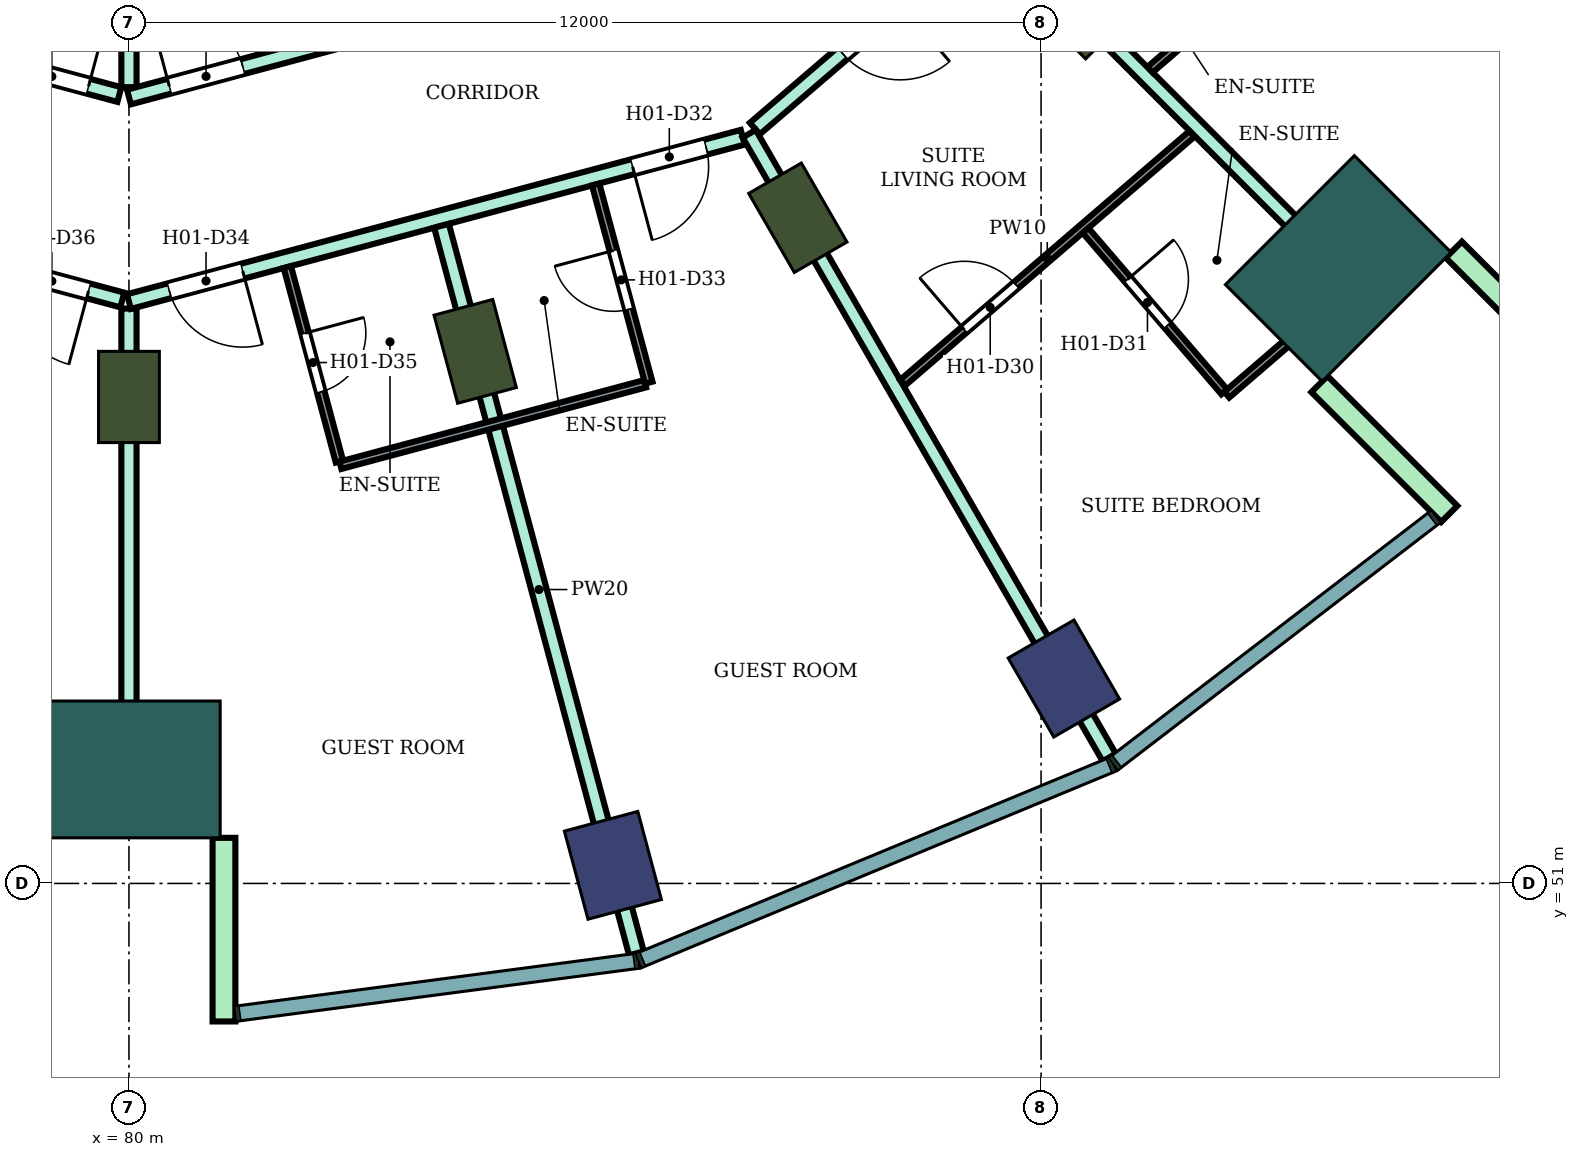
"""IFC4 building model, lengths in metres.
Left out: names, types, materials, properties, quantities, classifications, styles, units other than length and angle.
Written with IfcOpenShell. Run it as: python <this file> out.ifc"""

import sys

from ifc_helpers import new_model, si_unit, direction, frame, frame_2d, origin, origin_2d, place, context, subcontext, project, spatial, rectangle, extrude, element, fill, save


model = new_model("IFC4")
c1 = context("Model", 3, precision=1e-05, world=origin(), true_north=direction((0.0, 1.0)))
c2 = subcontext(c1, "Body", "Model", "MODEL_VIEW")
j1 = project(units=[si_unit("LENGTHUNIT", "METRE"), si_unit("PLANEANGLEUNIT", "RADIAN")], contexts=[c1])
p1 = place(None, origin())
s1 = spatial("IfcSite", under=j1, at=p1, CompositionType="ELEMENT")
p2 = place(p1, origin())
s2 = spatial("IfcBuilding", under=s1, at=p2, CompositionType="ELEMENT")
p3 = place(p2, frame((0.0, 0.0, 36.4)))
s3 = spatial("IfcBuildingStorey", under=s2, at=p3, CompositionType="ELEMENT", Elevation=36.4)
for number, where, z_axis, x_axis in (
    (1, (86.367, 51.238, 0.0), (0.0, 0.0, 1.0), (0.259, -0.966, 0.0)),
    (2, (92.3, 53.696, 0.0), (0.0, 0.0, 1.0), (0.5, -0.866, 0.0)),
):
    element("IfcColumn", number, at=place(p3, frame(where, z_axis=z_axis, x_axis=x_axis)), inside=s3, PredefinedType="COLUMN", context=c2, shape_type="SweptSolid", body=[
        extrude(rectangle(XDim=1.2, YDim=1.0, at=origin_2d()), origin(), (0.0, 0.0, 1.0), 3.8),
    ])
for number, where, z_axis, x_axis in (
    (3, (80.0, 57.4, 0.0), (0.0, 0.0, 1.0), (0.0, -1.0, 0.0)),
    (4, (84.555, 58.0, 0.0), (0.0, 0.0, 1.0), (0.259, -0.966, 0.0)),
    (5, (88.8, 59.758, 0.0), (0.0, 0.0, 1.0), (0.5, -0.866, 0.0)),
    (6, (92.445, 62.555, 0.0), (0.0, 0.0, 1.0), (0.707, -0.707, 0.0)),
):
    element("IfcColumn", number, at=place(p3, frame(where, z_axis=z_axis, x_axis=x_axis)), inside=s3, PredefinedType="COLUMN", context=c2, shape_type="SweptSolid", body=[
        extrude(rectangle(XDim=1.2, YDim=0.8, at=origin_2d()), origin(), (0.0, 0.0, 1.0), 3.8),
    ])
for number, where, z_axis, x_axis in (
    (7, (80.0, 52.5, 0.0), (0.0, 0.0, 1.0), (0.0, -1.0, 0.0)),
    (8, (95.91, 59.09, 0.0), (0.0, 0.0, 1.0), (0.707, -0.707, 0.0)),
):
    element("IfcColumn", number, at=place(p3, frame(where, z_axis=z_axis, x_axis=x_axis)), inside=s3, PredefinedType="COLUMN", context=c2, shape_type="SweptSolid", body=[
        extrude(rectangle(XDim=1.8, YDim=2.4, at=origin_2d()), origin(), (0.0, 0.0, 1.0), 3.8),
    ])
for number, where, z_axis, x_axis in (
    (9, (81.25, 51.6, 0.0), (0.0, 0.0, 1.0), (0.0, -1.0, 0.0)),
    (10, (95.662, 57.57, 0.0), (0.0, 0.0, 1.0), (0.707, -0.707, 0.0)),
    (11, (97.43, 59.338, 0.0), (0.0, 0.0, 1.0), (0.707, -0.707, 0.0)),
):
    element("IfcWall", number, at=place(p3, frame(where, z_axis=z_axis, x_axis=x_axis)), inside=s3, PredefinedType="NOTDEFINED", context=c2, shape_type="SweptSolid", body=[
        extrude(rectangle(XDim=2.416, YDim=0.3, at=frame_2d((1.208, 0.0))), origin(), (0.0, 0.0, 1.0), 3.8),
    ])
p4 = place(p3, frame((71.877, 60.831, 0.0), z_axis=(0.0, 0.0, 1.0), x_axis=(0.965852509869, -0.259092510851, 0.0)))
e12 = element("IfcWall", 12, at=p4, inside=s3, PredefinedType="PARTITIONING", context=c2, shape_type="SweptSolid", body=[
    extrude(rectangle(XDim=8.32, YDim=0.2, at=frame_2d((4.16, 0.0))), origin(), (0.0, 0.0, 1.0), 3.35),
])
p5 = place(p4, frame((6.86, 0.0, 0.0)))
e13 = element("IfcOpeningElement", 13, at=p5, cuts=e12, PredefinedType="OPENING", context=c2, shape_type="SweptSolid", body=[
    extrude(rectangle(XDim=1.0, YDim=2.1, at=frame_2d((0.5, 1.05))), frame((0.0, 0.11, 0.0), z_axis=(0.0, -1.0, 0.0), x_axis=(1.0, 0.0, 0.0)), (0.0, 0.0, 1.0), 0.22),
])
p6 = place(p3, frame((73.297, 63.143, 0.0), z_axis=(0.0, 0.0, 1.0), x_axis=(0.965859030528, -0.25906820173, 0.0)))
e14 = element("IfcWall", 14, at=p6, inside=s3, PredefinedType="PARTITIONING", context=c2, shape_type="SweptSolid", body=[
    extrude(rectangle(XDim=6.81, YDim=0.2, at=frame_2d((3.405, 0.0))), origin(), (0.0, 0.0, 1.0), 3.35),
])
p7 = place(p6, frame((5.39, 0.0, 0.0)))
e15 = element("IfcOpeningElement", 15, at=p7, cuts=e14, PredefinedType="OPENING", context=c2, shape_type="SweptSolid", body=[
    extrude(rectangle(XDim=1.0, YDim=2.1, at=frame_2d((0.5, 1.05))), frame((0.0, 0.11, 0.0), z_axis=(0.0, -1.0, 0.0), x_axis=(1.0, 0.0, 0.0)), (0.0, 0.0, 1.0), 0.22),
])
p8 = place(p3, frame((80.0, 51.801, 0.0), z_axis=(0.0, 0.0, 1.0), x_axis=(0.0, 1.0, 0.0)))
e16 = element("IfcWall", 16, at=p8, inside=s3, PredefinedType="PARTITIONING", context=c2, shape_type="SweptSolid", body=[
    extrude(rectangle(XDim=6.762, YDim=0.2, at=frame_2d((3.381, 0.0))), origin(), (0.0, 0.0, 1.0), 3.35),
])
p9 = place(p3, frame((80.0, 58.655, 0.0), z_axis=(0.0, 0.0, 1.0), x_axis=(0.965974635626, 0.258636817424, 0.0)))
e17 = element("IfcWall", 17, at=p9, inside=s3, PredefinedType="PARTITIONING", context=c2, shape_type="SweptSolid", body=[
    extrude(rectangle(XDim=8.36, YDim=0.2, at=frame_2d((4.18, 0.0))), origin(), (0.0, 0.0, 1.0), 3.35),
])
p10 = place(p9, frame((6.86, 0.0, 0.0)))
e18 = element("IfcOpeningElement", 18, at=p10, cuts=e17, PredefinedType="OPENING", context=c2, shape_type="SweptSolid", body=[
    extrude(rectangle(XDim=1.0, YDim=2.1, at=frame_2d((0.5, 1.05))), frame((0.0, 0.11, 0.0), z_axis=(0.0, -1.0, 0.0), x_axis=(1.0, 0.0, 0.0)), (0.0, 0.0, 1.0), 0.22),
])
p11 = place(p9, frame((0.55, 0.0, 0.0)))
e19 = element("IfcOpeningElement", 19, at=p11, cuts=e17, PredefinedType="OPENING", context=c2, shape_type="SweptSolid", body=[
    extrude(rectangle(XDim=1.0, YDim=2.1, at=frame_2d((0.5, 1.05))), frame((0.0, 0.11, 0.0), z_axis=(0.0, -1.0, 0.0), x_axis=(1.0, 0.0, 0.0)), (0.0, 0.0, 1.0), 0.22),
])
p12 = place(p3, frame((80.0, 61.476, 0.0), z_axis=(0.0, 0.0, 1.0), x_axis=(0.0, 1.0, 0.0)))
e20 = element("IfcWall", 20, at=p12, inside=s3, PredefinedType="PARTITIONING", context=c2, shape_type="SweptSolid", body=[
    extrude(rectangle(XDim=5.825, YDim=0.2, at=frame_2d((2.913, 0.0))), origin(), (0.0, 0.0, 1.0), 3.35),
])
p13 = place(p3, frame((80.0, 61.346, 0.0), z_axis=(0.0, 0.0, 1.0), x_axis=(0.965924181808, 0.258825182312, 0.0)))
e21 = element("IfcWall", 21, at=p13, inside=s3, PredefinedType="PARTITIONING", context=c2, shape_type="SweptSolid", body=[
    extrude(rectangle(XDim=6.94, YDim=0.2, at=frame_2d((3.47, 0.0))), origin(), (0.0, 0.0, 1.0), 3.35),
])
p14 = place(p13, frame((0.55, 0.0, 0.0)))
e22 = element("IfcOpeningElement", 22, at=p14, cuts=e21, PredefinedType="OPENING", context=c2, shape_type="SweptSolid", body=[
    extrude(rectangle(XDim=1.0, YDim=2.1, at=frame_2d((0.5, 1.05))), frame((0.0, 0.11, 0.0), z_axis=(0.0, -1.0, 0.0), x_axis=(1.0, 0.0, 0.0)), (0.0, 0.0, 1.0), 0.22),
])
p15 = place(p3, frame((84.112, 59.652, 0.0), z_axis=(0.0, 0.0, 1.0), x_axis=(0.258791091927, -0.965933315886, 0.0)))
e23 = element("IfcWall", 23, at=p15, inside=s3, PredefinedType="PARTITIONING", context=c2, shape_type="SweptSolid", body=[
    extrude(rectangle(XDim=9.909, YDim=0.2, at=frame_2d((4.955, 0.0))), origin(), (0.0, 0.0, 1.0), 3.35),
])
p16 = place(p3, frame((88.235, 60.931, 0.0), z_axis=(0.0, 0.0, 1.0), x_axis=(0.758799498714, 0.651324282329, 0.0)))
e24 = element("IfcWall", 24, at=p16, inside=s3, PredefinedType="PARTITIONING", context=c2, shape_type="SweptSolid", body=[
    extrude(rectangle(XDim=6.186, YDim=0.2, at=frame_2d((3.093, 0.0))), origin(), (0.0, 0.0, 1.0), 3.35),
])
p17 = place(p16, frame((1.519, 0.0, 0.0)))
e25 = element("IfcOpeningElement", 25, at=p17, cuts=e24, PredefinedType="OPENING", context=c2, shape_type="SweptSolid", body=[
    extrude(rectangle(XDim=1.0, YDim=2.1, at=frame_2d((0.5, 1.05))), frame((0.0, 0.11, 0.0), z_axis=(0.0, -1.0, 0.0), x_axis=(1.0, 0.0, 0.0)), (0.0, 0.0, 1.0), 0.22),
])
p18 = place(p3, frame((88.16, 60.863, 0.0), z_axis=(0.0, 0.0, 1.0), x_axis=(0.499946996988, -0.866056002925, 0.0)))
e26 = element("IfcWall", 26, at=p18, inside=s3, PredefinedType="PARTITIONING", context=c2, shape_type="SweptSolid", body=[
    extrude(rectangle(XDim=9.475, YDim=0.2, at=frame_2d((4.737, 0.0))), origin(), (0.0, 0.0, 1.0), 3.35),
])
p19 = place(p3, frame((91.449, 63.548, 0.0), z_axis=(0.0, 0.0, 1.0), x_axis=(0.706984804638, -0.707228736698, 0.0)))
e27 = element("IfcWall", 27, at=p19, inside=s3, PredefinedType="PARTITIONING", context=c2, shape_type="SweptSolid", body=[
    extrude(rectangle(XDim=7.006, YDim=0.2, at=frame_2d((3.503, 0.0))), origin(), (0.0, 0.0, 1.0), 3.35),
])
p20 = place(p3, frame((82.084, 59.108, 0.0), z_axis=(0.0, 0.0, 1.0), x_axis=(0.258591746437, -0.965986702121, 0.0)))
e28 = element("IfcWall", 28, at=p20, inside=s3, PredefinedType="PARTITIONING", context=c2, shape_type="SweptSolid", body=[
    extrude(rectangle(XDim=2.649, YDim=0.1, at=frame_2d((1.325, 0.0))), origin(), (0.0, 0.0, 1.0), 3.35),
])
p21 = place(p20, frame((0.9, 0.0, 0.0)))
e29 = element("IfcOpeningElement", 29, at=p21, cuts=e28, PredefinedType="OPENING", context=c2, shape_type="SweptSolid", body=[
    extrude(rectangle(XDim=0.8, YDim=2.1, at=frame_2d((0.4, 1.05))), frame((0.0, 0.06, 0.0), z_axis=(0.0, -1.0, 0.0), x_axis=(1.0, 0.0, 0.0)), (0.0, 0.0, 1.0), 0.12),
])
p22 = place(p3, frame((82.782, 56.501, 0.0), z_axis=(0.0, 0.0, 1.0), x_axis=(0.965999228418, 0.258544949083, 0.0)))
e30 = element("IfcWall", 30, at=p22, inside=s3, PredefinedType="PARTITIONING", context=c2, shape_type="SweptSolid", body=[
    extrude(rectangle(XDim=4.15, YDim=0.1, at=frame_2d((2.075, 0.0))), origin(), (0.0, 0.0, 1.0), 3.35),
])
p23 = place(p3, frame((86.14, 60.196, 0.0), z_axis=(0.0, 0.0, 1.0), x_axis=(0.258945475746, -0.965891940432, 0.0)))
e31 = element("IfcWall", 31, at=p23, inside=s3, PredefinedType="PARTITIONING", context=c2, shape_type="SweptSolid", body=[
    extrude(rectangle(XDim=2.7, YDim=0.1, at=frame_2d((1.35, 0.0))), origin(), (0.0, 0.0, 1.0), 3.35),
])
p24 = place(p23, frame((0.9, 0.0, 0.0)))
e32 = element("IfcOpeningElement", 32, at=p24, cuts=e31, PredefinedType="OPENING", context=c2, shape_type="SweptSolid", body=[
    extrude(rectangle(XDim=0.8, YDim=2.1, at=frame_2d((0.4, 1.05))), frame((0.0, 0.06, 0.0), z_axis=(0.0, -1.0, 0.0), x_axis=(1.0, 0.0, 0.0)), (0.0, 0.0, 1.0), 0.12),
])
p25 = place(p3, frame((90.178, 57.587, 0.0), z_axis=(0.0, 0.0, 1.0), x_axis=(0.758140003227, 0.652091815243, 0.0)))
e33 = element("IfcWall", 33, at=p25, inside=s3, PredefinedType="PARTITIONING", context=c2, shape_type="SweptSolid", body=[
    extrude(rectangle(XDim=5.021, YDim=0.1, at=frame_2d((2.51, 0.0))), origin(), (0.0, 0.0, 1.0), 3.35),
])
p26 = place(p25, frame((1.071, 0.0, 0.0)))
e34 = element("IfcOpeningElement", 34, at=p26, cuts=e33, PredefinedType="OPENING", context=c2, shape_type="SweptSolid", body=[
    extrude(rectangle(XDim=0.9, YDim=2.1, at=frame_2d((0.45, 1.05))), frame((0.0, 0.06, 0.0), z_axis=(0.0, -1.0, 0.0), x_axis=(1.0, 0.0, 0.0)), (0.0, 0.0, 1.0), 0.12),
])
p27 = place(p3, frame((92.585, 59.591, 0.0), z_axis=(0.0, 0.0, 1.0), x_axis=(0.652011200591, -0.758209334092, 0.0)))
e35 = element("IfcWall", 35, at=p27, inside=s3, PredefinedType="PARTITIONING", context=c2, shape_type="SweptSolid", body=[
    extrude(rectangle(XDim=2.8, YDim=0.1, at=frame_2d((1.4, 0.0))), origin(), (0.0, 0.0, 1.0), 3.35),
])
p28 = place(p27, frame((0.85, 0.0, 0.0)))
e36 = element("IfcOpeningElement", 36, at=p28, cuts=e35, PredefinedType="OPENING", context=c2, shape_type="SweptSolid", body=[
    extrude(rectangle(XDim=0.8, YDim=2.1, at=frame_2d((0.4, 1.05))), frame((0.0, 0.06, 0.0), z_axis=(0.0, -1.0, 0.0), x_axis=(1.0, 0.0, 0.0)), (0.0, 0.0, 1.0), 0.12),
])
p29 = place(p3, frame((93.435, 61.707, 0.0), z_axis=(0.0, 0.0, 1.0), x_axis=(0.758070495124, 0.652172618578, 0.0)))
e37 = element("IfcWall", 37, at=p29, inside=s3, PredefinedType="PARTITIONING", context=c2, shape_type="SweptSolid", body=[
    extrude(rectangle(XDim=1.789, YDim=0.1, at=frame_2d((0.895, 0.0))), origin(), (0.0, 0.0, 1.0), 3.35),
])
p30 = place(p3, frame((94.443, 57.43, 0.0), z_axis=(0.0, 0.0, 1.0), x_axis=(0.757840386328, 0.65243999636, 0.0)))
e38 = element("IfcWall", 38, at=p30, inside=s3, PredefinedType="PARTITIONING", context=c2, shape_type="SweptSolid", body=[
    extrude(rectangle(XDim=2.108, YDim=0.1, at=frame_2d((1.054, 0.0))), origin(), (0.0, 0.0, 1.0), 3.35),
])
p31 = place(p17, frame((1.0, 0.0, 0.0), z_axis=(0.0, 0.0, 1.0), x_axis=(-1.0, 0.0, 0.0)))
e39 = element("IfcDoor", 39, at=p31, inside=s3, OperationType="SINGLE_SWING_LEFT", PredefinedType="DOOR", context=c2, shape_type="SweptSolid", body=[
    extrude(rectangle(XDim=1.0, YDim=2.1, at=frame_2d((0.5, 1.05))), frame((0.0, 0.025, 0.0), z_axis=(0.0, -1.0, 0.0), x_axis=(1.0, 0.0, 0.0)), (0.0, 0.0, 1.0), 0.05),
])
fill(e25, e39)
p32 = place(p26, origin())
e40 = element("IfcDoor", 40, at=p32, inside=s3, OperationType="SINGLE_SWING_LEFT", PredefinedType="DOOR", context=c2, shape_type="SweptSolid", body=[
    extrude(rectangle(XDim=0.9, YDim=2.1, at=frame_2d((0.45, 1.05))), frame((0.0, 0.025, 0.0), z_axis=(0.0, -1.0, 0.0), x_axis=(1.0, 0.0, 0.0)), (0.0, 0.0, 1.0), 0.05),
])
fill(e34, e40)
p33 = place(p28, origin())
e41 = element("IfcDoor", 41, at=p33, inside=s3, OperationType="SINGLE_SWING_LEFT", PredefinedType="DOOR", context=c2, shape_type="SweptSolid", body=[
    extrude(rectangle(XDim=0.8, YDim=2.1, at=frame_2d((0.4, 1.05))), frame((0.0, 0.025, 0.0), z_axis=(0.0, -1.0, 0.0), x_axis=(1.0, 0.0, 0.0)), (0.0, 0.0, 1.0), 0.05),
])
fill(e36, e41)
p34 = place(p10, frame((1.0, 0.0, 0.0), z_axis=(0.0, 0.0, 1.0), x_axis=(-1.0, 0.0, 0.0)))
e42 = element("IfcDoor", 42, at=p34, inside=s3, OperationType="SINGLE_SWING_RIGHT", PredefinedType="DOOR", context=c2, shape_type="SweptSolid", body=[
    extrude(rectangle(XDim=1.0, YDim=2.1, at=frame_2d((0.5, 1.05))), frame((0.0, 0.025, 0.0), z_axis=(0.0, -1.0, 0.0), x_axis=(1.0, 0.0, 0.0)), (0.0, 0.0, 1.0), 0.05),
])
fill(e18, e42)
p35 = place(p24, frame((0.8, 0.0, 0.0), z_axis=(0.0, 0.0, 1.0), x_axis=(-1.0, 0.0, 0.0)))
e43 = element("IfcDoor", 43, at=p35, inside=s3, OperationType="SINGLE_SWING_RIGHT", PredefinedType="DOOR", context=c2, shape_type="SweptSolid", body=[
    extrude(rectangle(XDim=0.8, YDim=2.1, at=frame_2d((0.4, 1.05))), frame((0.0, 0.025, 0.0), z_axis=(0.0, -1.0, 0.0), x_axis=(1.0, 0.0, 0.0)), (0.0, 0.0, 1.0), 0.05),
])
fill(e32, e43)
p36 = place(p11, frame((1.0, 0.0, 0.0), z_axis=(0.0, 0.0, 1.0), x_axis=(-1.0, 0.0, 0.0)))
e44 = element("IfcDoor", 44, at=p36, inside=s3, OperationType="SINGLE_SWING_LEFT", PredefinedType="DOOR", context=c2, shape_type="SweptSolid", body=[
    extrude(rectangle(XDim=1.0, YDim=2.1, at=frame_2d((0.5, 1.05))), frame((0.0, 0.025, 0.0), z_axis=(0.0, -1.0, 0.0), x_axis=(1.0, 0.0, 0.0)), (0.0, 0.0, 1.0), 0.05),
])
fill(e19, e44)
p37 = place(p21, origin())
e45 = element("IfcDoor", 45, at=p37, inside=s3, OperationType="SINGLE_SWING_LEFT", PredefinedType="DOOR", context=c2, shape_type="SweptSolid", body=[
    extrude(rectangle(XDim=0.8, YDim=2.1, at=frame_2d((0.4, 1.05))), frame((0.0, 0.025, 0.0), z_axis=(0.0, -1.0, 0.0), x_axis=(1.0, 0.0, 0.0)), (0.0, 0.0, 1.0), 0.05),
])
fill(e29, e45)
p38 = place(p5, frame((1.0, 0.0, 0.0), z_axis=(0.0, 0.0, 1.0), x_axis=(-1.0, 0.0, 0.0)))
e46 = element("IfcDoor", 46, at=p38, inside=s3, OperationType="SINGLE_SWING_LEFT", PredefinedType="DOOR", context=c2, shape_type="SweptSolid", body=[
    extrude(rectangle(XDim=1.0, YDim=2.1, at=frame_2d((0.5, 1.05))), frame((0.0, 0.025, 0.0), z_axis=(0.0, -1.0, 0.0), x_axis=(1.0, 0.0, 0.0)), (0.0, 0.0, 1.0), 0.05),
])
fill(e13, e46)
p39 = place(p14, origin())
e47 = element("IfcDoor", 47, at=p39, inside=s3, OperationType="SINGLE_SWING_LEFT", PredefinedType="DOOR", context=c2, shape_type="SweptSolid", body=[
    extrude(rectangle(XDim=1.0, YDim=2.1, at=frame_2d((0.5, 1.05))), frame((0.0, 0.025, 0.0), z_axis=(0.0, -1.0, 0.0), x_axis=(1.0, 0.0, 0.0)), (0.0, 0.0, 1.0), 0.05),
])
fill(e22, e47)
p40 = place(p7, origin())
e48 = element("IfcDoor", 48, at=p40, inside=s3, OperationType="SINGLE_SWING_RIGHT", PredefinedType="DOOR", context=c2, shape_type="SweptSolid", body=[
    extrude(rectangle(XDim=1.0, YDim=2.1, at=frame_2d((0.5, 1.05))), frame((0.0, 0.025, 0.0), z_axis=(0.0, -1.0, 0.0), x_axis=(1.0, 0.0, 0.0)), (0.0, 0.0, 1.0), 0.05),
])
fill(e15, e48)
save(model, sys.argv[1])
